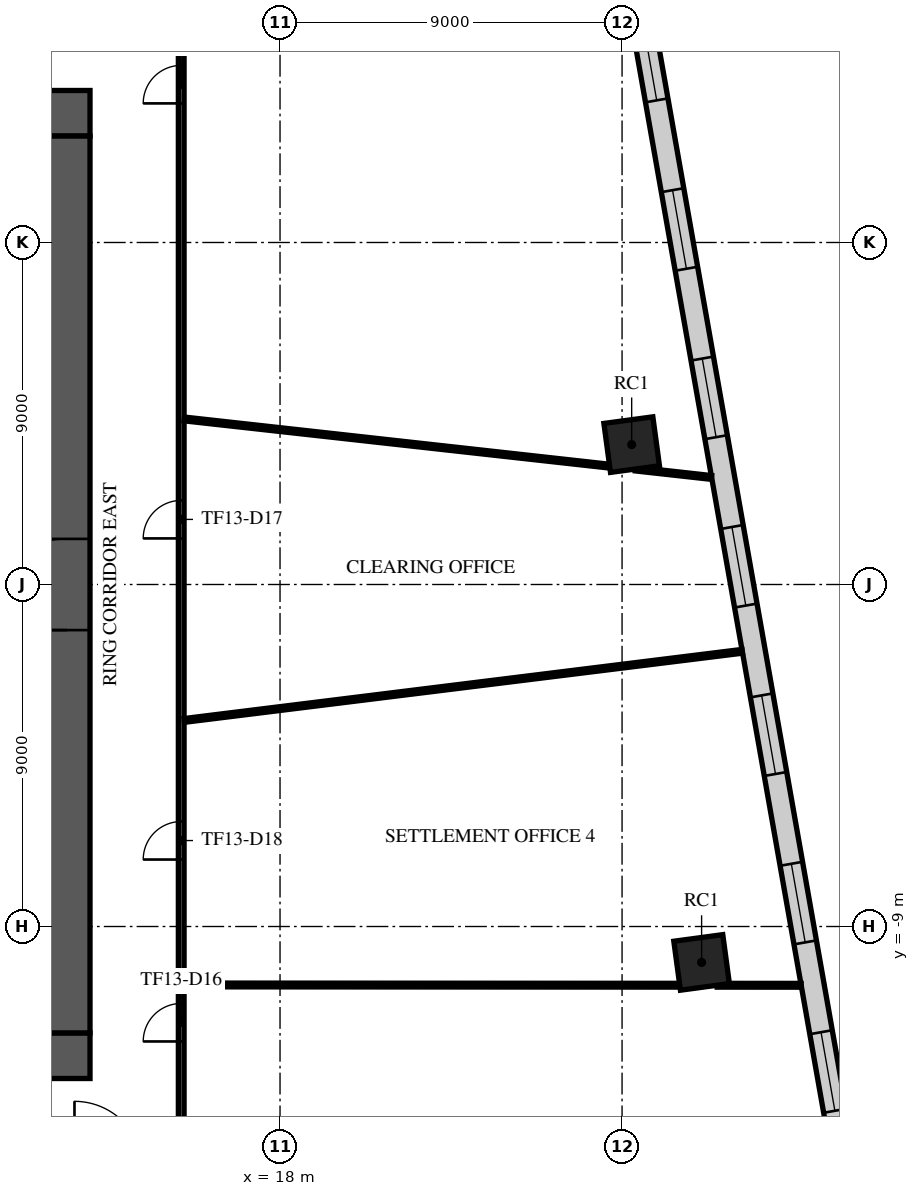
"""IFC4 building model, lengths in metres.
Left out: names, types, materials, properties, quantities, classifications, styles, units other than length and angle.
Written with IfcOpenShell. Run it as: python <this file> out.ifc"""

import sys

from ifc_helpers import new_model, si_unit, direction, frame, frame_2d, origin, origin_2d, place, context, subcontext, project, spatial, rectangle, extrude, element, fill, save


model = new_model("IFC4")
c1 = context("Model", 3, precision=1e-05, world=origin(), true_north=direction((0.0, 1.0)))
c2 = subcontext(c1, "Body", "Model", "MODEL_VIEW")
j1 = project(units=[si_unit("LENGTHUNIT", "METRE"), si_unit("PLANEANGLEUNIT", "RADIAN")], contexts=[c1])
p1 = place(None, origin())
s1 = spatial("IfcSite", under=j1, at=p1, CompositionType="ELEMENT")
p2 = place(p1, origin())
s2 = spatial("IfcBuilding", under=s1, at=p2, CompositionType="ELEMENT")
p3 = place(p2, frame((0.0, 0.0, 59.7)))
s3 = spatial("IfcBuildingStorey", under=s2, at=p3, CompositionType="ELEMENT", Elevation=59.7)
for number, where, z_axis, x_axis in (
    (1, (29.093, -9.945, 0.0), (0.0, 0.0, 1.0), (0.991, 0.134, 0.0)),
    (2, (27.253, 3.681, 0.0), (0.0, 0.0, 1.0), (0.991, 0.134, 0.0)),
):
    element("IfcColumn", number, at=place(p3, frame(where, z_axis=z_axis, x_axis=x_axis)), inside=s3, PredefinedType="COLUMN", context=c2, shape_type="SweptSolid", body=[
        extrude(rectangle(XDim=1.3, YDim=1.3, at=origin_2d()), origin(), (0.0, 0.0, 1.0), 4.2),
    ])
p4 = place(p3, frame((-13.0, 12.4, 0.0), z_axis=(0.0, 0.0, 1.0), x_axis=(1.0, 0.0, 0.0)))
e3 = element("IfcWall", 3, at=p4, inside=s3, PredefinedType="SHEAR", context=c2, shape_type="SweptSolid", body=[
    extrude(rectangle(XDim=26.0, YDim=1.2, at=frame_2d((13.0, 0.0))), origin(), (0.0, 0.0, 1.0), 3.75),
])
p5 = place(p4, frame((11.8, 0.0, 0.0)))
e4 = element("IfcOpeningElement", 4, at=p5, cuts=e3, PredefinedType="OPENING", context=c2, shape_type="SweptSolid", body=[
    extrude(rectangle(XDim=2.4, YDim=2.4, at=frame_2d((1.2, 1.2))), frame((0.0, 0.61, 0.0), z_axis=(0.0, -1.0, 0.0), x_axis=(1.0, 0.0, 0.0)), (0.0, 0.0, 1.0), 1.22),
])
p6 = place(p4, frame((22.625, 0.0, 0.0)))
e5 = element("IfcOpeningElement", 5, at=p6, cuts=e3, PredefinedType="OPENING", context=c2, shape_type="SweptSolid", body=[
    extrude(rectangle(XDim=1.2, YDim=2.1, at=frame_2d((0.6, 1.05))), frame((0.0, 0.61, 0.0), z_axis=(0.0, -1.0, 0.0), x_axis=(1.0, 0.0, 0.0)), (0.0, 0.0, 1.0), 1.22),
])
p7 = place(p4, frame((1.6, 0.0, 0.0)))
e6 = element("IfcOpeningElement", 6, at=p7, cuts=e3, PredefinedType="OPENING", context=c2, shape_type="SweptSolid", body=[
    extrude(rectangle(XDim=1.0, YDim=2.1, at=frame_2d((0.5, 1.05))), frame((0.0, 0.61, 0.0), z_axis=(0.0, -1.0, 0.0), x_axis=(1.0, 0.0, 0.0)), (0.0, 0.0, 1.0), 1.22),
])
p8 = place(p3, frame((-13.0, -12.4, 0.0), z_axis=(0.0, 0.0, 1.0), x_axis=(1.0, 0.0, 0.0)))
e7 = element("IfcWall", 7, at=p8, inside=s3, PredefinedType="SHEAR", context=c2, shape_type="SweptSolid", body=[
    extrude(rectangle(XDim=26.0, YDim=1.2, at=frame_2d((13.0, 0.0))), origin(), (0.0, 0.0, 1.0), 3.75),
])
p9 = place(p8, frame((7.9, 0.0, 0.0)))
e8 = element("IfcOpeningElement", 8, at=p9, cuts=e7, PredefinedType="OPENING", context=c2, shape_type="SweptSolid", body=[
    extrude(rectangle(XDim=2.0, YDim=2.1, at=frame_2d((1.0, 1.05))), frame((0.0, 0.61, 0.0), z_axis=(0.0, -1.0, 0.0), x_axis=(1.0, 0.0, 0.0)), (0.0, 0.0, 1.0), 1.22),
])
p10 = place(p8, frame((18.025, 0.0, 0.0)))
e9 = element("IfcOpeningElement", 9, at=p10, cuts=e7, PredefinedType="OPENING", context=c2, shape_type="SweptSolid", body=[
    extrude(rectangle(XDim=1.2, YDim=2.1, at=frame_2d((0.6, 1.05))), frame((0.0, 0.61, 0.0), z_axis=(0.0, -1.0, 0.0), x_axis=(1.0, 0.0, 0.0)), (0.0, 0.0, 1.0), 1.22),
])
p11 = place(p8, frame((2.175, 0.0, 0.0)))
e10 = element("IfcOpeningElement", 10, at=p11, cuts=e7, PredefinedType="OPENING", context=c2, shape_type="SweptSolid", body=[
    extrude(rectangle(XDim=1.2, YDim=2.1, at=frame_2d((0.6, 1.05))), frame((0.0, 0.61, 0.0), z_axis=(0.0, -1.0, 0.0), x_axis=(1.0, 0.0, 0.0)), (0.0, 0.0, 1.0), 1.22),
])
p12 = place(p8, frame((22.625, 0.0, 0.0)))
e11 = element("IfcOpeningElement", 11, at=p12, cuts=e7, PredefinedType="OPENING", context=c2, shape_type="SweptSolid", body=[
    extrude(rectangle(XDim=1.2, YDim=2.1, at=frame_2d((0.6, 1.05))), frame((0.0, 0.61, 0.0), z_axis=(0.0, -1.0, 0.0), x_axis=(1.0, 0.0, 0.0)), (0.0, 0.0, 1.0), 1.22),
])
p13 = place(p3, frame((12.4, -11.8, 0.0), z_axis=(0.0, 0.0, 1.0), x_axis=(0.0, 1.0, 0.0)))
e12 = element("IfcWall", 12, at=p13, inside=s3, PredefinedType="SHEAR", context=c2, shape_type="SweptSolid", body=[
    extrude(rectangle(XDim=23.6, YDim=1.2, at=frame_2d((11.8, 0.0))), origin(), (0.0, 0.0, 1.0), 3.75),
])
p14 = place(p13, frame((10.6, 0.0, 0.0)))
e13 = element("IfcOpeningElement", 13, at=p14, cuts=e12, PredefinedType="OPENING", context=c2, shape_type="SweptSolid", body=[
    extrude(rectangle(XDim=2.4, YDim=2.4, at=frame_2d((1.2, 1.2))), frame((0.0, 0.61, 0.0), z_axis=(0.0, -1.0, 0.0), x_axis=(1.0, 0.0, 0.0)), (0.0, 0.0, 1.0), 1.22),
])
p15 = place(p3, frame((33.568, -19.341, 0.0), z_axis=(0.0, 0.0, 1.0), x_axis=(-0.173647117517, 0.984807939945, 0.0)))
e14 = element("IfcWall", 14, at=p15, inside=s3, PredefinedType="STANDARD", context=c2, shape_type="SweptSolid", body=[
    extrude(rectangle(XDim=49.376, YDim=0.6, at=frame_2d((24.688, 0.0))), origin(), (0.0, 0.0, 1.0), 3.75),
])
p16 = place(p15, frame((1.138, 0.0, 0.9)))
e15 = element("IfcOpeningElement", 15, at=p16, cuts=e14, PredefinedType="OPENING", context=c2, shape_type="SweptSolid", body=[
    extrude(rectangle(XDim=2.1, YDim=2.1, at=frame_2d((1.05, 1.05))), frame((0.0, 0.31, 0.0), z_axis=(0.0, -1.0, 0.0), x_axis=(1.0, 0.0, 0.0)), (0.0, 0.0, 1.0), 0.62),
])
p17 = place(p15, frame((5.576, 0.0, 0.9)))
e16 = element("IfcOpeningElement", 16, at=p17, cuts=e14, PredefinedType="OPENING", context=c2, shape_type="SweptSolid", body=[
    extrude(rectangle(XDim=2.1, YDim=2.1, at=frame_2d((1.05, 1.05))), frame((0.0, 0.31, 0.0), z_axis=(0.0, -1.0, 0.0), x_axis=(1.0, 0.0, 0.0)), (0.0, 0.0, 1.0), 0.62),
])
p18 = place(p15, frame((10.076, 0.0, 0.9)))
e17 = element("IfcOpeningElement", 17, at=p18, cuts=e14, PredefinedType="OPENING", context=c2, shape_type="SweptSolid", body=[
    extrude(rectangle(XDim=2.1, YDim=2.1, at=frame_2d((1.05, 1.05))), frame((0.0, 0.31, 0.0), z_axis=(0.0, -1.0, 0.0), x_axis=(1.0, 0.0, 0.0)), (0.0, 0.0, 1.0), 0.62),
])
p19 = place(p15, frame((14.576, 0.0, 0.9)))
e18 = element("IfcOpeningElement", 18, at=p19, cuts=e14, PredefinedType="OPENING", context=c2, shape_type="SweptSolid", body=[
    extrude(rectangle(XDim=2.1, YDim=2.1, at=frame_2d((1.05, 1.05))), frame((0.0, 0.31, 0.0), z_axis=(0.0, -1.0, 0.0), x_axis=(1.0, 0.0, 0.0)), (0.0, 0.0, 1.0), 0.62),
])
p20 = place(p15, frame((19.076, 0.0, 0.9)))
e19 = element("IfcOpeningElement", 19, at=p20, cuts=e14, PredefinedType="OPENING", context=c2, shape_type="SweptSolid", body=[
    extrude(rectangle(XDim=2.1, YDim=2.1, at=frame_2d((1.05, 1.05))), frame((0.0, 0.31, 0.0), z_axis=(0.0, -1.0, 0.0), x_axis=(1.0, 0.0, 0.0)), (0.0, 0.0, 1.0), 0.62),
])
p21 = place(p15, frame((23.576, 0.0, 0.9)))
e20 = element("IfcOpeningElement", 20, at=p21, cuts=e14, PredefinedType="OPENING", context=c2, shape_type="SweptSolid", body=[
    extrude(rectangle(XDim=2.1, YDim=2.1, at=frame_2d((1.05, 1.05))), frame((0.0, 0.31, 0.0), z_axis=(0.0, -1.0, 0.0), x_axis=(1.0, 0.0, 0.0)), (0.0, 0.0, 1.0), 0.62),
])
p22 = place(p15, frame((28.076, 0.0, 0.9)))
e21 = element("IfcOpeningElement", 21, at=p22, cuts=e14, PredefinedType="OPENING", context=c2, shape_type="SweptSolid", body=[
    extrude(rectangle(XDim=2.1, YDim=2.1, at=frame_2d((1.05, 1.05))), frame((0.0, 0.31, 0.0), z_axis=(0.0, -1.0, 0.0), x_axis=(1.0, 0.0, 0.0)), (0.0, 0.0, 1.0), 0.62),
])
p23 = place(p15, frame((32.576, 0.0, 0.9)))
e22 = element("IfcOpeningElement", 22, at=p23, cuts=e14, PredefinedType="OPENING", context=c2, shape_type="SweptSolid", body=[
    extrude(rectangle(XDim=2.1, YDim=2.1, at=frame_2d((1.05, 1.05))), frame((0.0, 0.31, 0.0), z_axis=(0.0, -1.0, 0.0), x_axis=(1.0, 0.0, 0.0)), (0.0, 0.0, 1.0), 0.62),
])
p24 = place(p15, frame((37.076, 0.0, 0.9)))
e23 = element("IfcOpeningElement", 23, at=p24, cuts=e14, PredefinedType="OPENING", context=c2, shape_type="SweptSolid", body=[
    extrude(rectangle(XDim=2.1, YDim=2.1, at=frame_2d((1.05, 1.05))), frame((0.0, 0.31, 0.0), z_axis=(0.0, -1.0, 0.0), x_axis=(1.0, 0.0, 0.0)), (0.0, 0.0, 1.0), 0.62),
])
p25 = place(p15, frame((41.576, 0.0, 0.9)))
e24 = element("IfcOpeningElement", 24, at=p25, cuts=e14, PredefinedType="OPENING", context=c2, shape_type="SweptSolid", body=[
    extrude(rectangle(XDim=2.1, YDim=2.1, at=frame_2d((1.05, 1.05))), frame((0.0, 0.31, 0.0), z_axis=(0.0, -1.0, 0.0), x_axis=(1.0, 0.0, 0.0)), (0.0, 0.0, 1.0), 0.62),
])
p26 = place(p15, frame((46.076, 0.0, 0.9)))
e25 = element("IfcOpeningElement", 25, at=p26, cuts=e14, PredefinedType="OPENING", context=c2, shape_type="SweptSolid", body=[
    extrude(rectangle(XDim=2.1, YDim=2.1, at=frame_2d((1.05, 1.05))), frame((0.0, 0.31, 0.0), z_axis=(0.0, -1.0, 0.0), x_axis=(1.0, 0.0, 0.0)), (0.0, 0.0, 1.0), 0.62),
])
p27 = place(p3, frame((15.4, -15.325, 0.0), z_axis=(0.0, 0.0, 1.0), x_axis=(0.0, 1.0, 0.0)))
e26 = element("IfcWall", 26, at=p27, inside=s3, PredefinedType="PARTITIONING", context=c2, shape_type="SweptSolid", body=[
    extrude(rectangle(XDim=30.65, YDim=0.15, at=frame_2d((15.325, 0.0))), origin(), (0.0, 0.0, 1.0), 3.25),
])
p28 = place(p27, frame((27.985, 0.0, 0.0)))
e27 = element("IfcOpeningElement", 27, at=p28, cuts=e26, PredefinedType="OPENING", context=c2, shape_type="SweptSolid", body=[
    extrude(rectangle(XDim=1.0, YDim=2.1, at=frame_2d((0.5, 1.05))), frame((0.0, 0.085, 0.0), z_axis=(0.0, -1.0, 0.0), x_axis=(1.0, 0.0, 0.0)), (0.0, 0.0, 1.0), 0.17),
])
p29 = place(p27, frame((3.3, 0.0, 0.0)))
e28 = element("IfcOpeningElement", 28, at=p29, cuts=e26, PredefinedType="OPENING", context=c2, shape_type="SweptSolid", body=[
    extrude(rectangle(XDim=1.0, YDim=2.1, at=frame_2d((0.5, 1.05))), frame((0.0, 0.085, 0.0), z_axis=(0.0, -1.0, 0.0), x_axis=(1.0, 0.0, 0.0)), (0.0, 0.0, 1.0), 0.17),
])
p30 = place(p27, frame((16.538, 0.0, 0.0)))
e29 = element("IfcOpeningElement", 29, at=p30, cuts=e26, PredefinedType="OPENING", context=c2, shape_type="SweptSolid", body=[
    extrude(rectangle(XDim=1.0, YDim=2.1, at=frame_2d((0.5, 1.05))), frame((0.0, 0.085, 0.0), z_axis=(0.0, -1.0, 0.0), x_axis=(1.0, 0.0, 0.0)), (0.0, 0.0, 1.0), 0.17),
])
p31 = place(p27, frame((8.087, 0.0, 0.0)))
e30 = element("IfcOpeningElement", 30, at=p31, cuts=e26, PredefinedType="OPENING", context=c2, shape_type="SweptSolid", body=[
    extrude(rectangle(XDim=1.0, YDim=2.1, at=frame_2d((0.5, 1.05))), frame((0.0, 0.085, 0.0), z_axis=(0.0, -1.0, 0.0), x_axis=(1.0, 0.0, 0.0)), (0.0, 0.0, 1.0), 0.17),
])
p32 = place(p3, frame((15.475, -10.538, 0.0), z_axis=(0.0, 0.0, 1.0), x_axis=(0.999999862655, -0.000524108943, 0.0)))
e31 = element("IfcWall", 31, at=p32, inside=s3, PredefinedType="PARTITIONING", context=c2, shape_type="SweptSolid", body=[
    extrude(rectangle(XDim=13.043, YDim=0.1, at=frame_2d((6.521, 0.0))), origin(), (0.0, 0.0, 1.0), 3.25),
])
p33 = place(p3, frame((15.481, -3.577, 0.0), z_axis=(0.0, 0.0, 1.0), x_axis=(0.992414130602, 0.12293979576, 0.0)))
e32 = element("IfcWall", 32, at=p33, inside=s3, PredefinedType="PARTITIONING", context=c2, shape_type="SweptSolid", body=[
    extrude(rectangle(XDim=14.793, YDim=0.1, at=frame_2d((7.396, 0.0))), origin(), (0.0, 0.0, 1.0), 2.95),
])
p34 = place(p3, frame((15.48, 4.356, 0.0), z_axis=(0.0, 0.0, 1.0), x_axis=(0.993895889778, -0.11032207523, 0.0)))
e33 = element("IfcWall", 33, at=p34, inside=s3, PredefinedType="PARTITIONING", context=c2, shape_type="SweptSolid", body=[
    extrude(rectangle(XDim=11.262, YDim=0.1, at=frame_2d((5.631, 0.0))), origin(), (0.0, 0.0, 1.0), 3.25),
])
p35 = place(p3, frame((27.352, 3.039, 0.0), z_axis=(0.0, 0.0, 1.0), x_axis=(0.993891119471, -0.110365042642, 0.0)))
e34 = element("IfcWall", 34, at=p35, inside=s3, PredefinedType="PARTITIONING", context=c2, shape_type="SweptSolid", body=[
    extrude(rectangle(XDim=2.015, YDim=0.1, at=frame_2d((1.008, 0.0))), origin(), (0.0, 0.0, 1.0), 2.95),
])
p36 = place(p3, frame((29.503, -10.545, 0.0), z_axis=(0.0, 0.0, 1.0), x_axis=(0.999999847177, -0.000552852636, 0.0)))
e35 = element("IfcWall", 35, at=p36, inside=s3, PredefinedType="PARTITIONING", context=c2, shape_type="SweptSolid", body=[
    extrude(rectangle(XDim=2.208, YDim=0.1, at=frame_2d((1.104, 0.0))), origin(), (0.0, 0.0, 1.0), 3.75),
])
p37 = place(p14, origin())
e36 = element("IfcDoor", 36, at=p37, inside=s3, OperationType="SINGLE_SWING_LEFT", PredefinedType="DOOR", context=c2, shape_type="SweptSolid", body=[
    extrude(rectangle(XDim=2.4, YDim=2.4, at=frame_2d((1.2, 1.2))), frame((0.0, 0.025, 0.0), z_axis=(0.0, -1.0, 0.0), x_axis=(1.0, 0.0, 0.0)), (0.0, 0.0, 1.0), 0.05),
])
fill(e13, e36)
p38 = place(p17, origin())
e37 = element("IfcWindow", 37, at=p38, inside=s3, PartitioningType="SINGLE_PANEL", PredefinedType="WINDOW", context=c2, shape_type="SweptSolid", body=[
    extrude(rectangle(XDim=2.1, YDim=2.1, at=frame_2d((1.05, 1.05))), frame((0.0, 0.03, 0.0), z_axis=(0.0, -1.0, 0.0), x_axis=(1.0, 0.0, 0.0)), (0.0, 0.0, 1.0), 0.06),
])
fill(e16, e37)
p39 = place(p18, origin())
e38 = element("IfcWindow", 38, at=p39, inside=s3, PartitioningType="SINGLE_PANEL", PredefinedType="WINDOW", context=c2, shape_type="SweptSolid", body=[
    extrude(rectangle(XDim=2.1, YDim=2.1, at=frame_2d((1.05, 1.05))), frame((0.0, 0.03, 0.0), z_axis=(0.0, -1.0, 0.0), x_axis=(1.0, 0.0, 0.0)), (0.0, 0.0, 1.0), 0.06),
])
fill(e17, e38)
p40 = place(p19, origin())
e39 = element("IfcWindow", 39, at=p40, inside=s3, PartitioningType="SINGLE_PANEL", PredefinedType="WINDOW", context=c2, shape_type="SweptSolid", body=[
    extrude(rectangle(XDim=2.1, YDim=2.1, at=frame_2d((1.05, 1.05))), frame((0.0, 0.03, 0.0), z_axis=(0.0, -1.0, 0.0), x_axis=(1.0, 0.0, 0.0)), (0.0, 0.0, 1.0), 0.06),
])
fill(e18, e39)
p41 = place(p20, origin())
e40 = element("IfcWindow", 40, at=p41, inside=s3, PartitioningType="SINGLE_PANEL", PredefinedType="WINDOW", context=c2, shape_type="SweptSolid", body=[
    extrude(rectangle(XDim=2.1, YDim=2.1, at=frame_2d((1.05, 1.05))), frame((0.0, 0.03, 0.0), z_axis=(0.0, -1.0, 0.0), x_axis=(1.0, 0.0, 0.0)), (0.0, 0.0, 1.0), 0.06),
])
fill(e19, e40)
p42 = place(p21, origin())
e41 = element("IfcWindow", 41, at=p42, inside=s3, PartitioningType="SINGLE_PANEL", PredefinedType="WINDOW", context=c2, shape_type="SweptSolid", body=[
    extrude(rectangle(XDim=2.1, YDim=2.1, at=frame_2d((1.05, 1.05))), frame((0.0, 0.03, 0.0), z_axis=(0.0, -1.0, 0.0), x_axis=(1.0, 0.0, 0.0)), (0.0, 0.0, 1.0), 0.06),
])
fill(e20, e41)
p43 = place(p22, origin())
e42 = element("IfcWindow", 42, at=p43, inside=s3, PartitioningType="SINGLE_PANEL", PredefinedType="WINDOW", context=c2, shape_type="SweptSolid", body=[
    extrude(rectangle(XDim=2.1, YDim=2.1, at=frame_2d((1.05, 1.05))), frame((0.0, 0.03, 0.0), z_axis=(0.0, -1.0, 0.0), x_axis=(1.0, 0.0, 0.0)), (0.0, 0.0, 1.0), 0.06),
])
fill(e21, e42)
p44 = place(p23, origin())
e43 = element("IfcWindow", 43, at=p44, inside=s3, PartitioningType="SINGLE_PANEL", PredefinedType="WINDOW", context=c2, shape_type="SweptSolid", body=[
    extrude(rectangle(XDim=2.1, YDim=2.1, at=frame_2d((1.05, 1.05))), frame((0.0, 0.03, 0.0), z_axis=(0.0, -1.0, 0.0), x_axis=(1.0, 0.0, 0.0)), (0.0, 0.0, 1.0), 0.06),
])
fill(e22, e43)
p45 = place(p28, frame((1.0, 0.0, 0.0), z_axis=(0.0, 0.0, 1.0), x_axis=(-1.0, 0.0, 0.0)))
e44 = element("IfcDoor", 44, at=p45, inside=s3, OperationType="SINGLE_SWING_LEFT", PredefinedType="DOOR", context=c2, shape_type="SweptSolid", body=[
    extrude(rectangle(XDim=1.0, YDim=2.1, at=frame_2d((0.5, 1.05))), frame((0.0, 0.025, 0.0), z_axis=(0.0, -1.0, 0.0), x_axis=(1.0, 0.0, 0.0)), (0.0, 0.0, 1.0), 0.05),
])
fill(e27, e44)
p46 = place(p29, frame((1.0, 0.0, 0.0), z_axis=(0.0, 0.0, 1.0), x_axis=(-1.0, 0.0, 0.0)))
e45 = element("IfcDoor", 45, at=p46, inside=s3, OperationType="SINGLE_SWING_RIGHT", PredefinedType="DOOR", context=c2, shape_type="SweptSolid", body=[
    extrude(rectangle(XDim=1.0, YDim=2.1, at=frame_2d((0.5, 1.05))), frame((0.0, 0.025, 0.0), z_axis=(0.0, -1.0, 0.0), x_axis=(1.0, 0.0, 0.0)), (0.0, 0.0, 1.0), 0.05),
])
fill(e28, e45)
p47 = place(p30, frame((1.0, 0.0, 0.0), z_axis=(0.0, 0.0, 1.0), x_axis=(-1.0, 0.0, 0.0)))
e46 = element("IfcDoor", 46, at=p47, inside=s3, OperationType="SINGLE_SWING_RIGHT", PredefinedType="DOOR", context=c2, shape_type="SweptSolid", body=[
    extrude(rectangle(XDim=1.0, YDim=2.1, at=frame_2d((0.5, 1.05))), frame((0.0, 0.025, 0.0), z_axis=(0.0, -1.0, 0.0), x_axis=(1.0, 0.0, 0.0)), (0.0, 0.0, 1.0), 0.05),
])
fill(e29, e46)
p48 = place(p31, frame((1.0, 0.0, 0.0), z_axis=(0.0, 0.0, 1.0), x_axis=(-1.0, 0.0, 0.0)))
e47 = element("IfcDoor", 47, at=p48, inside=s3, OperationType="SINGLE_SWING_RIGHT", PredefinedType="DOOR", context=c2, shape_type="SweptSolid", body=[
    extrude(rectangle(XDim=1.0, YDim=2.1, at=frame_2d((0.5, 1.05))), frame((0.0, 0.025, 0.0), z_axis=(0.0, -1.0, 0.0), x_axis=(1.0, 0.0, 0.0)), (0.0, 0.0, 1.0), 0.05),
])
fill(e30, e47)
save(model, sys.argv[1])
